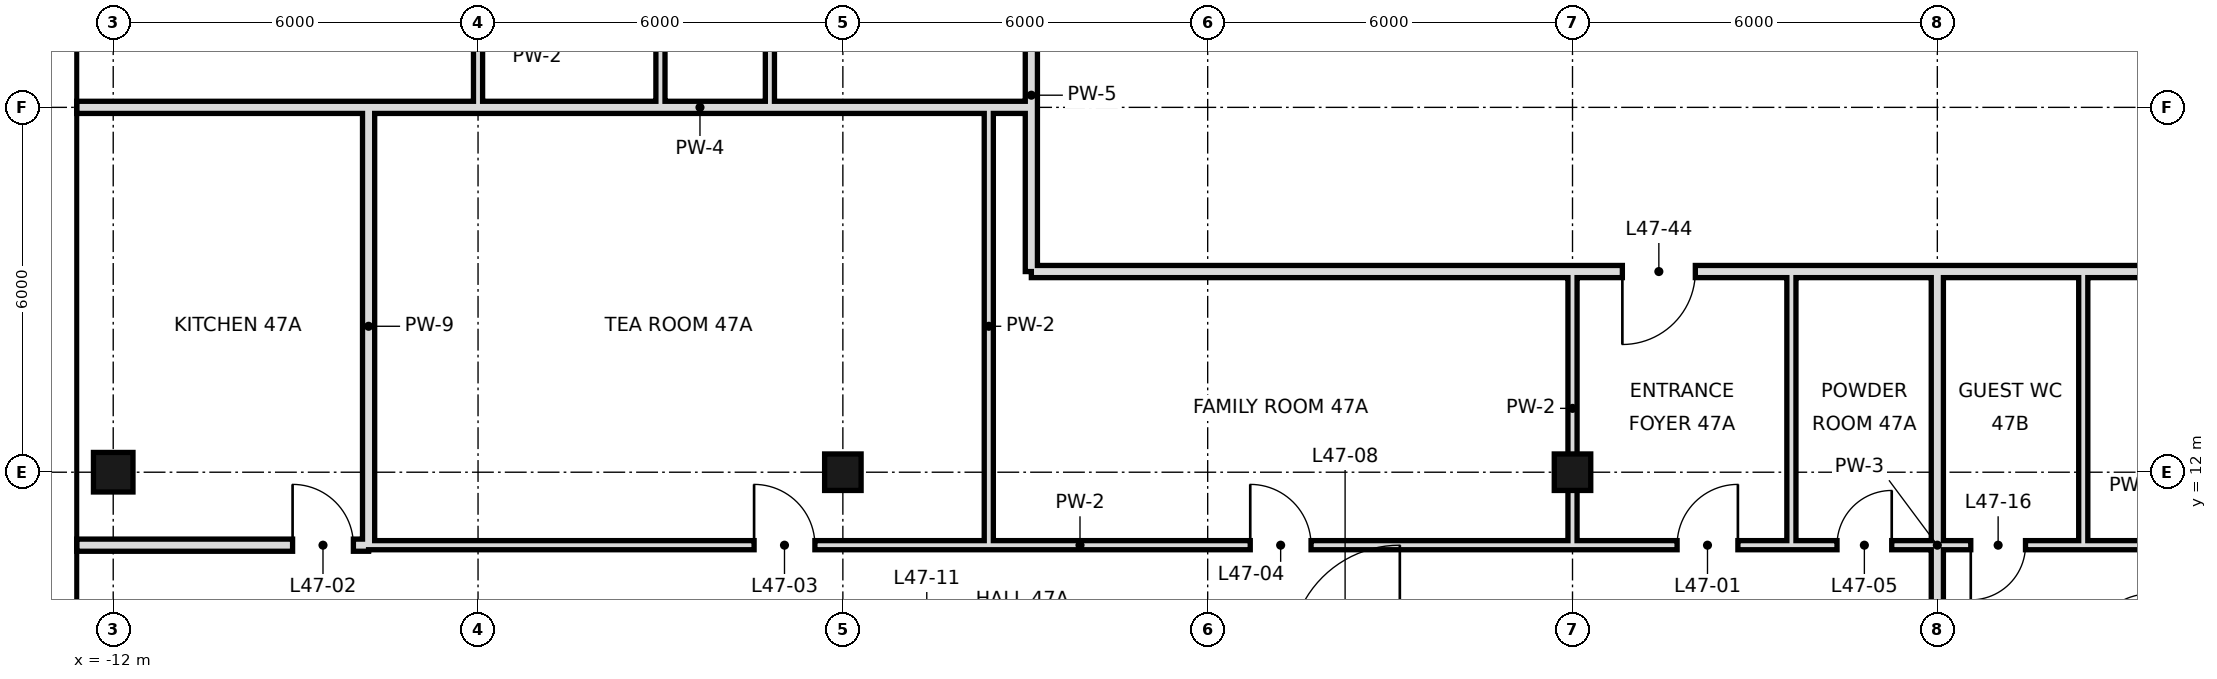
"""IFC4 building model, lengths in metres.
Left out: names, types, materials, properties, quantities, classifications, styles, units other than length and angle.
Written with IfcOpenShell. Run it as: python <this file> out.ifc"""

import sys

from ifc_helpers import new_model, si_unit, direction, frame, frame_2d, origin, origin_2d, place, context, subcontext, project, spatial, rectangle, hollow_rectangle, extrude, element, fill, save


model = new_model("IFC4")
c1 = context("Model", 3, precision=1e-05, world=origin(), true_north=direction((0.0, 1.0)))
c2 = subcontext(c1, "Body", "Model", "MODEL_VIEW")
j1 = project(units=[si_unit("LENGTHUNIT", "METRE"), si_unit("PLANEANGLEUNIT", "RADIAN")], contexts=[c1])
p1 = place(None, origin())
s1 = spatial("IfcSite", under=j1, at=p1, CompositionType="ELEMENT")
p2 = place(p1, origin())
s2 = spatial("IfcBuilding", under=s1, at=p2, CompositionType="ELEMENT")
p3 = place(p2, frame((0.0, 0.0, 202.8)))
s3 = spatial("IfcBuildingStorey", under=s2, at=p3, CompositionType="ELEMENT", Elevation=202.8)
p4 = place(p3, frame((-12.0, 12.0, 0.0), z_axis=(0.0, 0.0, 1.0), x_axis=(1.0, 0.0, 0.0)))
e1 = element("IfcColumn", 1, at=p4, inside=s3, PredefinedType="COLUMN", context=c2, shape_type="SweptSolid", body=[
    extrude(hollow_rectangle(XDim=0.65, YDim=0.65, WallThickness=0.032, at=origin_2d()), origin(), (0.0, 0.0, 1.0), 3.6),
])
for number, where, z_axis, x_axis in (
    (2, (0.0, 12.0, 0.0), (0.0, 0.0, 1.0), (1.0, 0.0, 0.0)),
    (3, (12.0, 12.0, 0.0), (0.0, 0.0, 1.0), (1.0, 0.0, 0.0)),
):
    element("IfcColumn", number, at=place(p3, frame(where, z_axis=z_axis, x_axis=x_axis)), inside=s3, PredefinedType="COLUMN", context=c2, shape_type="SweptSolid", body=[
        extrude(hollow_rectangle(XDim=0.6, YDim=0.6, WallThickness=0.028, at=origin_2d()), origin(), (0.0, 0.0, 1.0), 3.6),
    ])
p5 = place(p3, frame((-1.2, 18.0, 0.0), z_axis=(0.0, 0.0, 1.0), x_axis=(0.0, 1.0, 0.0)))
e4 = element("IfcWall", 4, at=p5, inside=s3, PredefinedType="PARTITIONING", context=c2, shape_type="SweptSolid", body=[
    extrude(rectangle(XDim=9.6, YDim=0.15, at=frame_2d((4.8, 0.0))), origin(), (0.0, 0.0, 1.0), 3.42),
])
p6 = place(p5, frame((2.68, 0.0, 0.0)))
e5 = element("IfcOpeningElement", 5, at=p6, cuts=e4, PredefinedType="OPENING", context=c2, shape_type="SweptSolid", body=[
    extrude(rectangle(XDim=1.0, YDim=2.4, at=frame_2d((0.5, 1.2))), frame((0.0, 0.085, 0.0), z_axis=(0.0, -1.0, 0.0), x_axis=(1.0, 0.0, 0.0)), (0.0, 0.0, 1.0), 0.17),
])
p7 = place(p3, frame((-3.0, 18.0, 0.0), z_axis=(0.0, 0.0, 1.0), x_axis=(0.0, 1.0, 0.0)))
e6 = element("IfcWall", 6, at=p7, inside=s3, PredefinedType="PARTITIONING", context=c2, shape_type="SweptSolid", body=[
    extrude(rectangle(XDim=3.6, YDim=0.15, at=frame_2d((1.8, 0.0))), origin(), (0.0, 0.0, 1.0), 3.42),
])
p8 = place(p7, frame((1.72, 0.0, 0.0)))
e7 = element("IfcOpeningElement", 7, at=p8, cuts=e6, PredefinedType="OPENING", context=c2, shape_type="SweptSolid", body=[
    extrude(rectangle(XDim=1.0, YDim=2.4, at=frame_2d((0.5, 1.2))), frame((0.0, 0.085, 0.0), z_axis=(0.0, -1.0, 0.0), x_axis=(1.0, 0.0, 0.0)), (0.0, 0.0, 1.0), 0.17),
])
p9 = place(p3, frame((-6.0, 18.0, 0.0), z_axis=(0.0, 0.0, 1.0), x_axis=(0.0, 1.0, 0.0)))
e8 = element("IfcWall", 8, at=p9, inside=s3, PredefinedType="PARTITIONING", context=c2, shape_type="SweptSolid", body=[
    extrude(rectangle(XDim=3.6, YDim=0.15, at=frame_2d((1.8, 0.0))), origin(), (0.0, 0.0, 1.0), 3.42),
])
p10 = place(p9, frame((1.72, 0.0, 0.0)))
e9 = element("IfcOpeningElement", 9, at=p10, cuts=e8, PredefinedType="OPENING", context=c2, shape_type="SweptSolid", body=[
    extrude(rectangle(XDim=1.0, YDim=2.4, at=frame_2d((0.5, 1.2))), frame((0.0, 0.085, 0.0), z_axis=(0.0, -1.0, 0.0), x_axis=(1.0, 0.0, 0.0)), (0.0, 0.0, 1.0), 0.17),
])
p11 = place(p3, frame((-7.8, 10.8, 0.0), z_axis=(0.0, 0.0, 1.0), x_axis=(0.0, 1.0, 0.0)))
e10 = element("IfcWall", 10, at=p11, inside=s3, PredefinedType="SOLIDWALL", context=c2, shape_type="SweptSolid", body=[
    extrude(rectangle(XDim=7.2, YDim=0.2, at=frame_2d((3.6, 0.0))), origin(), (0.0, 0.0, 1.0), 2.72),
])
p12 = place(p3, frame((12.0, 10.8, 0.0), z_axis=(0.0, 0.0, 1.0), x_axis=(0.0, 1.0, 0.0)))
e11 = element("IfcWall", 11, at=p12, inside=s3, PredefinedType="PARTITIONING", context=c2, shape_type="SweptSolid", body=[
    extrude(rectangle(XDim=4.5, YDim=0.15, at=frame_2d((2.25, 0.0))), origin(), (0.0, 0.0, 1.0), 2.72),
])
p13 = place(p3, frame((15.6, 10.8, 0.0), z_axis=(0.0, 0.0, 1.0), x_axis=(0.0, 1.0, 0.0)))
e12 = element("IfcWall", 12, at=p13, inside=s3, PredefinedType="PARTITIONING", context=c2, shape_type="SweptSolid", body=[
    extrude(rectangle(XDim=4.5, YDim=0.15, at=frame_2d((2.25, 0.0))), origin(), (0.0, 0.0, 1.0), 3.42),
])
p14 = place(p3, frame((18.0, -0.6, 0.0), z_axis=(0.0, 0.0, 1.0), x_axis=(0.0, 1.0, 0.0)))
e13 = element("IfcWall", 13, at=p14, inside=s3, PredefinedType="SOLIDWALL", context=c2, shape_type="SweptSolid", body=[
    extrude(rectangle(XDim=15.9, YDim=0.2, at=frame_2d((7.95, 0.0))), origin(), (0.0, 0.0, 1.0), 2.72),
])
p15 = place(p3, frame((2.4, 10.8, 0.0), z_axis=(0.0, 0.0, 1.0), x_axis=(0.0, 1.0, 0.0)))
e14 = element("IfcWall", 14, at=p15, inside=s3, PredefinedType="PARTITIONING", context=c2, shape_type="SweptSolid", body=[
    extrude(rectangle(XDim=7.2, YDim=0.15, at=frame_2d((3.6, 0.0))), origin(), (0.0, 0.0, 1.0), 3.42),
])
p16 = place(p3, frame((20.4, 10.8, 0.0), z_axis=(0.0, 0.0, 1.0), x_axis=(0.0, 1.0, 0.0)))
e15 = element("IfcWall", 15, at=p16, inside=s3, PredefinedType="PARTITIONING", context=c2, shape_type="SweptSolid", body=[
    extrude(rectangle(XDim=4.5, YDim=0.15, at=frame_2d((2.25, 0.0))), origin(), (0.0, 0.0, 1.0), 3.42),
])
p17 = place(p3, frame((3.1, 15.3, 0.0), z_axis=(0.0, 0.0, 1.0), x_axis=(0.0, 1.0, 0.0)))
e16 = element("IfcWall", 16, at=p17, inside=s3, PredefinedType="SOLIDWALL", context=c2, shape_type="SweptSolid", body=[
    extrude(rectangle(XDim=26.7, YDim=0.2, at=frame_2d((13.35, 0.0))), origin(), (0.0, 0.0, 1.0), 2.97),
])
p18 = place(p17, frame((16.5, 0.0, 0.0)))
e17 = element("IfcOpeningElement", 17, at=p18, cuts=e16, PredefinedType="OPENING", context=c2, shape_type="SweptSolid", body=[
    extrude(rectangle(XDim=1.2, YDim=2.4, at=frame_2d((0.6, 1.2))), frame((0.0, 0.11, 0.0), z_axis=(0.0, -1.0, 0.0), x_axis=(1.0, 0.0, 0.0)), (0.0, 0.0, 1.0), 0.22),
])
p19 = place(p3, frame((-12.6, 10.8, 0.0), z_axis=(0.0, 0.0, 1.0), x_axis=(1.0, 0.0, 0.0)))
e18 = element("IfcWall", 18, at=p19, inside=s3, PredefinedType="SOLIDWALL", context=c2, shape_type="SweptSolid", body=[
    extrude(rectangle(XDim=4.8, YDim=0.2, at=frame_2d((2.4, 0.0))), origin(), (0.0, 0.0, 1.0), 2.97),
])
p20 = place(p19, frame((3.55, 0.0, 0.0)))
e19 = element("IfcOpeningElement", 19, at=p20, cuts=e18, PredefinedType="OPENING", context=c2, shape_type="SweptSolid", body=[
    extrude(rectangle(XDim=1.0, YDim=2.4, at=frame_2d((0.5, 1.2))), frame((0.0, 0.11, 0.0), z_axis=(0.0, -1.0, 0.0), x_axis=(1.0, 0.0, 0.0)), (0.0, 0.0, 1.0), 0.22),
])
p21 = place(p3, frame((-7.8, 10.8, 0.0), z_axis=(0.0, 0.0, 1.0), x_axis=(1.0, 0.0, 0.0)))
e20 = element("IfcWall", 20, at=p21, inside=s3, PredefinedType="PARTITIONING", context=c2, shape_type="SweptSolid", body=[
    extrude(rectangle(XDim=23.4, YDim=0.15, at=frame_2d((11.7, 0.0))), origin(), (0.0, 0.0, 1.0), 3.42),
])
p22 = place(p21, frame((21.52, 0.0, 0.0)))
e21 = element("IfcOpeningElement", 21, at=p22, cuts=e20, PredefinedType="OPENING", context=c2, shape_type="SweptSolid", body=[
    extrude(rectangle(XDim=1.0, YDim=2.4, at=frame_2d((0.5, 1.2))), frame((0.0, 0.085, 0.0), z_axis=(0.0, -1.0, 0.0), x_axis=(1.0, 0.0, 0.0)), (0.0, 0.0, 1.0), 0.17),
])
p23 = place(p21, frame((6.34, 0.0, 0.0)))
e22 = element("IfcOpeningElement", 22, at=p23, cuts=e20, PredefinedType="OPENING", context=c2, shape_type="SweptSolid", body=[
    extrude(rectangle(XDim=1.0, YDim=2.4, at=frame_2d((0.5, 1.2))), frame((0.0, 0.085, 0.0), z_axis=(0.0, -1.0, 0.0), x_axis=(1.0, 0.0, 0.0)), (0.0, 0.0, 1.0), 0.17),
])
p24 = place(p21, frame((14.5, 0.0, 0.0)))
e23 = element("IfcOpeningElement", 23, at=p24, cuts=e20, PredefinedType="OPENING", context=c2, shape_type="SweptSolid", body=[
    extrude(rectangle(XDim=1.0, YDim=2.4, at=frame_2d((0.5, 1.2))), frame((0.0, 0.085, 0.0), z_axis=(0.0, -1.0, 0.0), x_axis=(1.0, 0.0, 0.0)), (0.0, 0.0, 1.0), 0.17),
])
p25 = place(p3, frame((20.4, 10.8, 0.0), z_axis=(0.0, 0.0, 1.0), x_axis=(1.0, 0.0, 0.0)))
e24 = element("IfcWall", 24, at=p25, inside=s3, PredefinedType="PARTITIONING", context=c2, shape_type="SweptSolid", body=[
    extrude(rectangle(XDim=3.6, YDim=0.15, at=frame_2d((1.8, 0.0))), origin(), (0.0, 0.0, 1.0), 3.42),
])
p26 = place(p25, frame((1.3, 0.0, 0.0)))
e25 = element("IfcOpeningElement", 25, at=p26, cuts=e24, PredefinedType="OPENING", context=c2, shape_type="SweptSolid", body=[
    extrude(rectangle(XDim=1.0, YDim=2.4, at=frame_2d((0.5, 1.2))), frame((0.0, 0.085, 0.0), z_axis=(0.0, -1.0, 0.0), x_axis=(1.0, 0.0, 0.0)), (0.0, 0.0, 1.0), 0.17),
])
p27 = place(p3, frame((15.6, 10.8, 0.0), z_axis=(0.0, 0.0, 1.0), x_axis=(1.0, 0.0, 0.0)))
e26 = element("IfcWall", 26, at=p27, inside=s3, PredefinedType="PARTITIONING", context=c2, shape_type="SweptSolid", body=[
    extrude(rectangle(XDim=4.8, YDim=0.15, at=frame_2d((2.4, 0.0))), origin(), (0.0, 0.0, 1.0), 3.42),
])
p28 = place(p27, frame((0.75, 0.0, 0.0)))
e27 = element("IfcOpeningElement", 27, at=p28, cuts=e26, PredefinedType="OPENING", context=c2, shape_type="SweptSolid", body=[
    extrude(rectangle(XDim=0.9, YDim=2.4, at=frame_2d((0.45, 1.2))), frame((0.0, 0.085, 0.0), z_axis=(0.0, -1.0, 0.0), x_axis=(1.0, 0.0, 0.0)), (0.0, 0.0, 1.0), 0.17),
])
p29 = place(p27, frame((2.95, 0.0, 0.0)))
e28 = element("IfcOpeningElement", 28, at=p29, cuts=e26, PredefinedType="OPENING", context=c2, shape_type="SweptSolid", body=[
    extrude(rectangle(XDim=0.9, YDim=2.4, at=frame_2d((0.45, 1.2))), frame((0.0, 0.085, 0.0), z_axis=(0.0, -1.0, 0.0), x_axis=(1.0, 0.0, 0.0)), (0.0, 0.0, 1.0), 0.17),
])
p30 = place(p3, frame((3.1, 15.3, 0.0), z_axis=(0.0, 0.0, 1.0), x_axis=(1.0, 0.0, 0.0)))
e29 = element("IfcWall", 29, at=p30, inside=s3, PredefinedType="SOLIDWALL", context=c2, shape_type="SweptSolid", body=[
    extrude(rectangle(XDim=20.9, YDim=0.2, at=frame_2d((10.45, 0.0))), origin(), (0.0, 0.0, 1.0), 2.72),
])
p31 = place(p30, frame((9.72, 0.0, 0.0)))
e30 = element("IfcOpeningElement", 30, at=p31, cuts=e29, PredefinedType="OPENING", context=c2, shape_type="SweptSolid", body=[
    extrude(rectangle(XDim=1.2, YDim=2.4, at=frame_2d((0.6, 1.2))), frame((0.0, 0.11, 0.0), z_axis=(0.0, -1.0, 0.0), x_axis=(1.0, 0.0, 0.0)), (0.0, 0.0, 1.0), 0.22),
])
p32 = place(p30, frame((18.5, 0.0, 0.0)))
e31 = element("IfcOpeningElement", 31, at=p32, cuts=e29, PredefinedType="OPENING", context=c2, shape_type="SweptSolid", body=[
    extrude(rectangle(XDim=1.2, YDim=2.4, at=frame_2d((0.6, 1.2))), frame((0.0, 0.11, 0.0), z_axis=(0.0, -1.0, 0.0), x_axis=(1.0, 0.0, 0.0)), (0.0, 0.0, 1.0), 0.22),
])
p33 = place(p3, frame((-12.6, 18.0, 0.0), z_axis=(0.0, 0.0, 1.0), x_axis=(1.0, 0.0, 0.0)))
e32 = element("IfcWall", 32, at=p33, inside=s3, PredefinedType="SOLIDWALL", context=c2, shape_type="SweptSolid", body=[
    extrude(rectangle(XDim=4.8, YDim=0.2, at=frame_2d((2.4, 0.0))), origin(), (0.0, 0.0, 1.0), 2.72),
])
p34 = place(p3, frame((-7.8, 18.0, 0.0), z_axis=(0.0, 0.0, 1.0), x_axis=(1.0, 0.0, 0.0)))
e33 = element("IfcWall", 33, at=p34, inside=s3, PredefinedType="SOLIDWALL", context=c2, shape_type="SweptSolid", body=[
    extrude(rectangle(XDim=10.9, YDim=0.2, at=frame_2d((5.45, 0.0))), origin(), (0.0, 0.0, 1.0), 2.72),
])
p35 = place(p22, frame((1.0, 0.0, 0.0), z_axis=(0.0, 0.0, 1.0), x_axis=(-1.0, 0.0, 0.0)))
e34 = element("IfcDoor", 34, at=p35, inside=s3, OperationType="SINGLE_SWING_LEFT", PredefinedType="DOOR", context=c2, shape_type="SweptSolid", body=[
    extrude(rectangle(XDim=1.0, YDim=2.4, at=frame_2d((0.5, 1.2))), frame((0.0, 0.025, 0.0), z_axis=(0.0, -1.0, 0.0), x_axis=(1.0, 0.0, 0.0)), (0.0, 0.0, 1.0), 0.05),
])
fill(e21, e34)
p36 = place(p20, origin())
e35 = element("IfcDoor", 35, at=p36, inside=s3, OperationType="SINGLE_SWING_LEFT", PredefinedType="DOOR", context=c2, shape_type="SweptSolid", body=[
    extrude(rectangle(XDim=1.0, YDim=2.4, at=frame_2d((0.5, 1.2))), frame((0.0, 0.025, 0.0), z_axis=(0.0, -1.0, 0.0), x_axis=(1.0, 0.0, 0.0)), (0.0, 0.0, 1.0), 0.05),
])
fill(e19, e35)
p37 = place(p23, origin())
e36 = element("IfcDoor", 36, at=p37, inside=s3, OperationType="SINGLE_SWING_LEFT", PredefinedType="DOOR", context=c2, shape_type="SweptSolid", body=[
    extrude(rectangle(XDim=1.0, YDim=2.4, at=frame_2d((0.5, 1.2))), frame((0.0, 0.025, 0.0), z_axis=(0.0, -1.0, 0.0), x_axis=(1.0, 0.0, 0.0)), (0.0, 0.0, 1.0), 0.05),
])
fill(e22, e36)
p38 = place(p24, origin())
e37 = element("IfcDoor", 37, at=p38, inside=s3, OperationType="SINGLE_SWING_LEFT", PredefinedType="DOOR", context=c2, shape_type="SweptSolid", body=[
    extrude(rectangle(XDim=1.0, YDim=2.4, at=frame_2d((0.5, 1.2))), frame((0.0, 0.025, 0.0), z_axis=(0.0, -1.0, 0.0), x_axis=(1.0, 0.0, 0.0)), (0.0, 0.0, 1.0), 0.05),
])
fill(e23, e37)
p39 = place(p28, frame((0.9, 0.0, 0.0), z_axis=(0.0, 0.0, 1.0), x_axis=(-1.0, 0.0, 0.0)))
e38 = element("IfcDoor", 38, at=p39, inside=s3, OperationType="SINGLE_SWING_LEFT", PredefinedType="DOOR", context=c2, shape_type="SweptSolid", body=[
    extrude(rectangle(XDim=0.9, YDim=2.4, at=frame_2d((0.45, 1.2))), frame((0.0, 0.025, 0.0), z_axis=(0.0, -1.0, 0.0), x_axis=(1.0, 0.0, 0.0)), (0.0, 0.0, 1.0), 0.05),
])
fill(e27, e38)
p40 = place(p29, frame((0.9, 0.0, 0.0), z_axis=(0.0, 0.0, 1.0), x_axis=(-1.0, 0.0, 0.0)))
e39 = element("IfcDoor", 39, at=p40, inside=s3, OperationType="SINGLE_SWING_RIGHT", PredefinedType="DOOR", context=c2, shape_type="SweptSolid", body=[
    extrude(rectangle(XDim=0.9, YDim=2.4, at=frame_2d((0.45, 1.2))), frame((0.0, 0.025, 0.0), z_axis=(0.0, -1.0, 0.0), x_axis=(1.0, 0.0, 0.0)), (0.0, 0.0, 1.0), 0.05),
])
fill(e28, e39)
p41 = place(p31, frame((1.2, 0.0, 0.0), z_axis=(0.0, 0.0, 1.0), x_axis=(-1.0, 0.0, 0.0)))
e40 = element("IfcDoor", 40, at=p41, inside=s3, OperationType="SINGLE_SWING_RIGHT", PredefinedType="DOOR", context=c2, shape_type="SweptSolid", body=[
    extrude(rectangle(XDim=1.2, YDim=2.4, at=frame_2d((0.6, 1.2))), frame((0.0, 0.025, 0.0), z_axis=(0.0, -1.0, 0.0), x_axis=(1.0, 0.0, 0.0)), (0.0, 0.0, 1.0), 0.05),
])
fill(e30, e40)
save(model, sys.argv[1])
